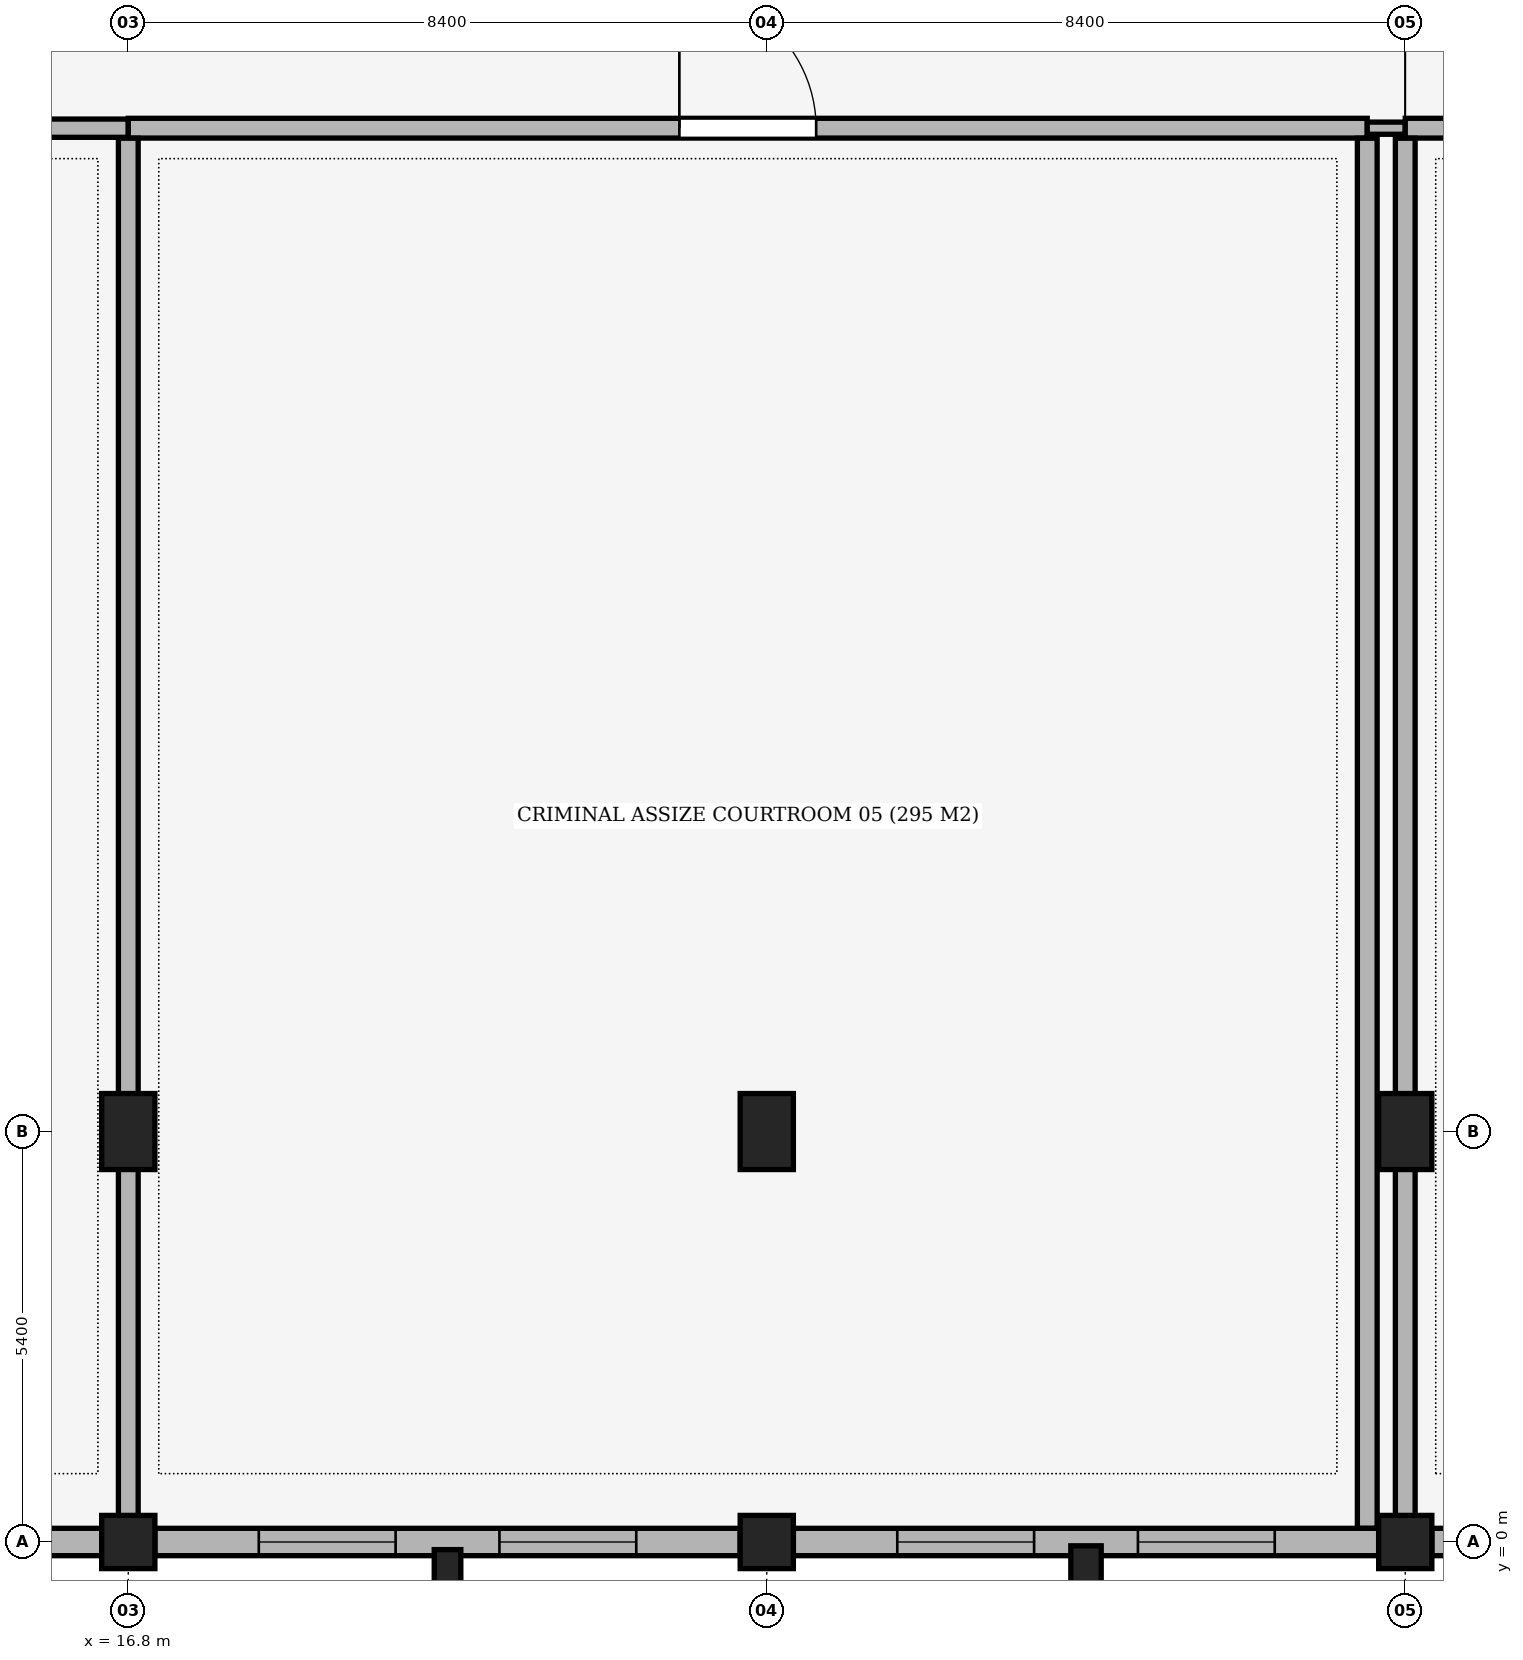
"""IFC4 building model, lengths in metres.
Left out: names, types, materials, properties, quantities, classifications, styles, units other than length and angle.
Written with IfcOpenShell. Run it as: python <this file> out.ifc"""

import sys

from ifc_helpers import new_model, si_unit, direction, frame, frame_2d, origin, origin_2d, place, context, subcontext, project, spatial, rectangle, extrude, element, fill, save


model = new_model("IFC4")
c1 = context("Model", 3, precision=1e-05, world=origin(), true_north=direction((0.0, 1.0)))
c2 = subcontext(c1, "Body", "Model", "MODEL_VIEW")
j1 = project(units=[si_unit("LENGTHUNIT", "METRE"), si_unit("PLANEANGLEUNIT", "RADIAN")], contexts=[c1])
p1 = place(None, origin())
s1 = spatial("IfcSite", under=j1, at=p1, CompositionType="ELEMENT")
p2 = place(p1, origin())
s2 = spatial("IfcBuilding", under=s1, at=p2, CompositionType="ELEMENT")
p3 = place(p2, frame((0.0, 0.0, 5.1)))
s3 = spatial("IfcBuildingStorey", under=s2, at=p3, CompositionType="ELEMENT", Elevation=5.1)
p4 = place(p3, frame((16.8, 0.0, 0.0), z_axis=(0.0, 0.0, 1.0), x_axis=(1.0, 0.0, 0.0)))
e1 = element("IfcColumn", 1, at=p4, inside=s3, PredefinedType="COLUMN", context=c2, shape_type="SweptSolid", body=[
    extrude(rectangle(XDim=0.7, YDim=0.7, at=origin_2d()), origin(), (0.0, 0.0, 1.0), 5.1),
])
p5 = place(p3, frame((16.8, 5.4, 0.0), z_axis=(0.0, 0.0, 1.0), x_axis=(1.0, 0.0, 0.0)))
e2 = element("IfcColumn", 2, at=p5, inside=s3, PredefinedType="COLUMN", context=c2, shape_type="SweptSolid", body=[
    extrude(rectangle(XDim=0.7, YDim=1.0, at=origin_2d()), origin(), (0.0, 0.0, 1.0), 5.1),
])
p6 = place(p3, frame((25.2, 0.0, 0.0), z_axis=(0.0, 0.0, 1.0), x_axis=(1.0, 0.0, 0.0)))
e3 = element("IfcColumn", 3, at=p6, inside=s3, PredefinedType="COLUMN", context=c2, shape_type="SweptSolid", body=[
    extrude(rectangle(XDim=0.7, YDim=0.7, at=origin_2d()), origin(), (0.0, 0.0, 1.0), 5.1),
])
p7 = place(p3, frame((25.2, 5.4, 0.0), z_axis=(0.0, 0.0, 1.0), x_axis=(1.0, 0.0, 0.0)))
e4 = element("IfcColumn", 4, at=p7, inside=s3, PredefinedType="COLUMN", context=c2, shape_type="SweptSolid", body=[
    extrude(rectangle(XDim=0.7, YDim=1.0, at=origin_2d()), origin(), (0.0, 0.0, 1.0), 5.1),
])
p8 = place(p3, frame((33.6, 0.0, 0.0), z_axis=(0.0, 0.0, 1.0), x_axis=(1.0, 0.0, 0.0)))
e5 = element("IfcColumn", 5, at=p8, inside=s3, PredefinedType="COLUMN", context=c2, shape_type="SweptSolid", body=[
    extrude(rectangle(XDim=0.7, YDim=0.7, at=origin_2d()), origin(), (0.0, 0.0, 1.0), 5.1),
])
p9 = place(p3, frame((33.6, 5.4, 0.0), z_axis=(0.0, 0.0, 1.0), x_axis=(1.0, 0.0, 0.0)))
e6 = element("IfcColumn", 6, at=p9, inside=s3, PredefinedType="COLUMN", context=c2, shape_type="SweptSolid", body=[
    extrude(rectangle(XDim=0.7, YDim=1.0, at=origin_2d()), origin(), (0.0, 0.0, 1.0), 5.1),
])
p10 = place(p3, frame((21.0, -0.35, 0.0), z_axis=(0.0, 0.0, 1.0), x_axis=(1.0, 0.0, 0.0)))
e7 = element("IfcColumn", 7, at=p10, inside=s3, PredefinedType="PILASTER", context=c2, shape_type="SweptSolid", body=[
    extrude(rectangle(XDim=0.35, YDim=0.5, at=origin_2d()), origin(), (0.0, 0.0, 1.0), 5.1),
])
p11 = place(p3, frame((29.4, -0.35, 0.0), z_axis=(0.0, 0.0, 1.0), x_axis=(1.0, 0.0, 0.0)))
e8 = element("IfcColumn", 8, at=p11, inside=s3, PredefinedType="PILASTER", context=c2, shape_type="SweptSolid", body=[
    extrude(rectangle(XDim=0.4, YDim=0.6, at=origin_2d()), origin(), (0.0, 0.0, 1.0), 5.1),
])
p12 = place(p3, frame((41.65, 0.0, 0.0), z_axis=(0.0, 0.0, 1.0), x_axis=(-1.0, 0.0, 0.0)))
e9 = element("IfcWall", 9, at=p12, inside=s3, PredefinedType="SOLIDWALL", context=c2, shape_type="SweptSolid", body=[
    extrude(rectangle(XDim=7.7, YDim=0.36, at=frame_2d((3.85, 0.0))), origin(), (0.0, 0.0, 1.0), 4.07),
])
p13 = place(p12, frame((2.25, 0.0, 0.75)))
e10 = element("IfcOpeningElement", 10, at=p13, cuts=e9, PredefinedType="OPENING", context=c2, shape_type="SweptSolid", body=[
    extrude(rectangle(XDim=3.2, YDim=2.6, at=frame_2d((1.6, 1.3))), frame((0.0, 0.195, 0.0), z_axis=(0.0, -1.0, 0.0), x_axis=(1.0, 0.0, 0.0)), (0.0, 0.0, 1.0), 0.39),
])
p14 = place(p3, frame((33.25, 0.0, 0.0), z_axis=(0.0, 0.0, 1.0), x_axis=(-1.0, 0.0, 0.0)))
e11 = element("IfcWall", 11, at=p14, inside=s3, PredefinedType="SOLIDWALL", context=c2, shape_type="SweptSolid", body=[
    extrude(rectangle(XDim=7.7, YDim=0.36, at=frame_2d((3.85, 0.0))), origin(), (0.0, 0.0, 1.0), 4.07),
])
p15 = place(p14, frame((1.367, 0.0, 0.85)))
e12 = element("IfcOpeningElement", 12, at=p15, cuts=e11, PredefinedType="OPENING", context=c2, shape_type="SweptSolid", body=[
    extrude(rectangle(XDim=1.8, YDim=2.4, at=frame_2d((0.9, 1.2))), frame((0.0, 0.195, 0.0), z_axis=(0.0, -1.0, 0.0), x_axis=(1.0, 0.0, 0.0)), (0.0, 0.0, 1.0), 0.39),
])
p16 = place(p14, frame((4.533, 0.0, 0.85)))
e13 = element("IfcOpeningElement", 13, at=p16, cuts=e11, PredefinedType="OPENING", context=c2, shape_type="SweptSolid", body=[
    extrude(rectangle(XDim=1.8, YDim=2.4, at=frame_2d((0.9, 1.2))), frame((0.0, 0.195, 0.0), z_axis=(0.0, -1.0, 0.0), x_axis=(1.0, 0.0, 0.0)), (0.0, 0.0, 1.0), 0.39),
])
p17 = place(p3, frame((24.85, 0.0, 0.0), z_axis=(0.0, 0.0, 1.0), x_axis=(-1.0, 0.0, 0.0)))
e14 = element("IfcWall", 14, at=p17, inside=s3, PredefinedType="SOLIDWALL", context=c2, shape_type="SweptSolid", body=[
    extrude(rectangle(XDim=7.7, YDim=0.36, at=frame_2d((3.85, 0.0))), origin(), (0.0, 0.0, 1.0), 4.07),
])
p18 = place(p17, frame((1.367, 0.0, 0.85)))
e15 = element("IfcOpeningElement", 15, at=p18, cuts=e14, PredefinedType="OPENING", context=c2, shape_type="SweptSolid", body=[
    extrude(rectangle(XDim=1.8, YDim=2.4, at=frame_2d((0.9, 1.2))), frame((0.0, 0.195, 0.0), z_axis=(0.0, -1.0, 0.0), x_axis=(1.0, 0.0, 0.0)), (0.0, 0.0, 1.0), 0.39),
])
p19 = place(p17, frame((4.533, 0.0, 0.85)))
e16 = element("IfcOpeningElement", 16, at=p19, cuts=e14, PredefinedType="OPENING", context=c2, shape_type="SweptSolid", body=[
    extrude(rectangle(XDim=1.8, YDim=2.4, at=frame_2d((0.9, 1.2))), frame((0.0, 0.195, 0.0), z_axis=(0.0, -1.0, 0.0), x_axis=(1.0, 0.0, 0.0)), (0.0, 0.0, 1.0), 0.39),
])
p20 = place(p3, frame((16.45, 0.0, 0.0), z_axis=(0.0, 0.0, 1.0), x_axis=(-1.0, 0.0, 0.0)))
e17 = element("IfcWall", 17, at=p20, inside=s3, PredefinedType="SOLIDWALL", context=c2, shape_type="SweptSolid", body=[
    extrude(rectangle(XDim=7.7, YDim=0.36, at=frame_2d((3.85, 0.0))), origin(), (0.0, 0.0, 1.0), 4.07),
])
p21 = place(p20, frame((1.367, 0.0, 0.85)))
e18 = element("IfcOpeningElement", 18, at=p21, cuts=e17, PredefinedType="OPENING", context=c2, shape_type="SweptSolid", body=[
    extrude(rectangle(XDim=1.8, YDim=2.4, at=frame_2d((0.9, 1.2))), frame((0.0, 0.195, 0.0), z_axis=(0.0, -1.0, 0.0), x_axis=(1.0, 0.0, 0.0)), (0.0, 0.0, 1.0), 0.39),
])
p22 = place(p20, frame((4.533, 0.0, 0.85)))
e19 = element("IfcOpeningElement", 19, at=p22, cuts=e17, PredefinedType="OPENING", context=c2, shape_type="SweptSolid", body=[
    extrude(rectangle(XDim=1.8, YDim=2.4, at=frame_2d((0.9, 1.2))), frame((0.0, 0.195, 0.0), z_axis=(0.0, -1.0, 0.0), x_axis=(1.0, 0.0, 0.0)), (0.0, 0.0, 1.0), 0.39),
])
p23 = place(p3, frame((0.182, 18.6, 0.0), z_axis=(0.0, 0.0, 1.0), x_axis=(1.0, 0.0, 0.0)))
e20 = element("IfcWall", 20, at=p23, inside=s3, PredefinedType="PARTITIONING", context=c2, shape_type="SweptSolid", body=[
    extrude(rectangle(XDim=16.618, YDim=0.24, at=frame_2d((8.309, 0.0))), origin(), (0.0, 0.0, 1.0), 3.67),
])
p24 = place(p23, frame((7.409, 0.0, 0.0)))
e21 = element("IfcOpeningElement", 21, at=p24, cuts=e20, PredefinedType="OPENING", context=c2, shape_type="SweptSolid", body=[
    extrude(rectangle(XDim=1.8, YDim=2.4, at=frame_2d((0.9, 1.2))), frame((0.0, 0.135, 0.0), z_axis=(0.0, -1.0, 0.0), x_axis=(1.0, 0.0, 0.0)), (0.0, 0.0, 1.0), 0.27),
])
p25 = place(p3, frame((16.8, 18.6, 0.0), z_axis=(0.0, 0.0, 1.0), x_axis=(1.0, 0.0, 0.0)))
e22 = element("IfcWall", 22, at=p25, inside=s3, PredefinedType="PARTITIONING", context=c2, shape_type="SweptSolid", body=[
    extrude(rectangle(XDim=16.3, YDim=0.26, at=frame_2d((8.15, 0.0))), origin(), (0.0, 0.0, 1.0), 3.67),
])
p26 = place(p25, frame((7.25, 0.0, 0.0)))
e23 = element("IfcOpeningElement", 23, at=p26, cuts=e22, PredefinedType="OPENING", context=c2, shape_type="SweptSolid", body=[
    extrude(rectangle(XDim=1.8, YDim=2.4, at=frame_2d((0.9, 1.2))), frame((0.0, 0.145, 0.0), z_axis=(0.0, -1.0, 0.0), x_axis=(1.0, 0.0, 0.0)), (0.0, 0.0, 1.0), 0.29),
])
p27 = place(p3, frame((33.1, 18.6, 0.0), z_axis=(0.0, 0.0, 1.0), x_axis=(1.0, 0.0, 0.0)))
e24 = element("IfcWall", 24, at=p27, inside=s3, PredefinedType="PARTITIONING", context=c2, shape_type="SweptSolid", body=[
    extrude(rectangle(XDim=0.5, YDim=0.16, at=frame_2d((0.25, 0.0))), origin(), (0.0, 0.0, 1.0), 3.67),
])
p28 = place(p3, frame((33.6, 18.6, 0.0), z_axis=(0.0, 0.0, 1.0), x_axis=(1.0, 0.0, 0.0)))
e25 = element("IfcWall", 25, at=p28, inside=s3, PredefinedType="PARTITIONING", context=c2, shape_type="SweptSolid", body=[
    extrude(rectangle(XDim=16.8, YDim=0.26, at=frame_2d((8.4, 0.0))), origin(), (0.0, 0.0, 1.0), 3.67),
])
p29 = place(p28, frame((7.5, 0.0, 0.0)))
e26 = element("IfcOpeningElement", 26, at=p29, cuts=e25, PredefinedType="OPENING", context=c2, shape_type="SweptSolid", body=[
    extrude(rectangle(XDim=1.8, YDim=2.4, at=frame_2d((0.9, 1.2))), frame((0.0, 0.145, 0.0), z_axis=(0.0, -1.0, 0.0), x_axis=(1.0, 0.0, 0.0)), (0.0, 0.0, 1.0), 0.29),
])
p30 = place(p3, frame((16.8, 0.065, 0.0), z_axis=(0.0, 0.0, 1.0), x_axis=(0.0, 1.0, 0.0)))
e27 = element("IfcWall", 27, at=p30, inside=s3, PredefinedType="PARTITIONING", context=c2, shape_type="SweptSolid", body=[
    extrude(rectangle(XDim=18.403, YDim=0.26, at=frame_2d((9.202, 0.0))), origin(), (0.0, 0.0, 1.0), 3.67),
])
p31 = place(p3, frame((33.1, 0.182, 0.0), z_axis=(0.0, 0.0, 1.0), x_axis=(0.0, 1.0, 0.0)))
e28 = element("IfcWall", 28, at=p31, inside=s3, PredefinedType="PARTITIONING", context=c2, shape_type="SweptSolid", body=[
    extrude(rectangle(XDim=18.286, YDim=0.26, at=frame_2d((9.143, 0.0))), origin(), (0.0, 0.0, 1.0), 4.07),
])
p32 = place(p3, frame((33.6, 0.065, 0.0), z_axis=(0.0, 0.0, 1.0), x_axis=(0.0, 1.0, 0.0)))
e29 = element("IfcWall", 29, at=p32, inside=s3, PredefinedType="PARTITIONING", context=c2, shape_type="SweptSolid", body=[
    extrude(rectangle(XDim=18.403, YDim=0.26, at=frame_2d((9.202, 0.0))), origin(), (0.0, 0.0, 1.0), 3.67),
])
p33 = place(p15, origin())
e30 = element("IfcWindow", 30, at=p33, inside=s3, PartitioningType="SINGLE_PANEL", PredefinedType="WINDOW", context=c2, shape_type="SweptSolid", body=[
    extrude(rectangle(XDim=1.8, YDim=2.4, at=frame_2d((0.9, 1.2))), frame((0.0, 0.03, 0.0), z_axis=(0.0, -1.0, 0.0), x_axis=(1.0, 0.0, 0.0)), (0.0, 0.0, 1.0), 0.06),
])
fill(e12, e30)
p34 = place(p16, origin())
e31 = element("IfcWindow", 31, at=p34, inside=s3, PartitioningType="SINGLE_PANEL", PredefinedType="WINDOW", context=c2, shape_type="SweptSolid", body=[
    extrude(rectangle(XDim=1.8, YDim=2.4, at=frame_2d((0.9, 1.2))), frame((0.0, 0.03, 0.0), z_axis=(0.0, -1.0, 0.0), x_axis=(1.0, 0.0, 0.0)), (0.0, 0.0, 1.0), 0.06),
])
fill(e13, e31)
p35 = place(p18, origin())
e32 = element("IfcWindow", 32, at=p35, inside=s3, PartitioningType="SINGLE_PANEL", PredefinedType="WINDOW", context=c2, shape_type="SweptSolid", body=[
    extrude(rectangle(XDim=1.8, YDim=2.4, at=frame_2d((0.9, 1.2))), frame((0.0, 0.03, 0.0), z_axis=(0.0, -1.0, 0.0), x_axis=(1.0, 0.0, 0.0)), (0.0, 0.0, 1.0), 0.06),
])
fill(e15, e32)
p36 = place(p19, origin())
e33 = element("IfcWindow", 33, at=p36, inside=s3, PartitioningType="SINGLE_PANEL", PredefinedType="WINDOW", context=c2, shape_type="SweptSolid", body=[
    extrude(rectangle(XDim=1.8, YDim=2.4, at=frame_2d((0.9, 1.2))), frame((0.0, 0.03, 0.0), z_axis=(0.0, -1.0, 0.0), x_axis=(1.0, 0.0, 0.0)), (0.0, 0.0, 1.0), 0.06),
])
fill(e16, e33)
p37 = place(p26, origin())
e34 = element("IfcDoor", 34, at=p37, inside=s3, OperationType="SINGLE_SWING_LEFT", PredefinedType="DOOR", context=c2, shape_type="SweptSolid", body=[
    extrude(rectangle(XDim=1.8, YDim=2.4, at=frame_2d((0.9, 1.2))), frame((0.0, 0.025, 0.0), z_axis=(0.0, -1.0, 0.0), x_axis=(1.0, 0.0, 0.0)), (0.0, 0.0, 1.0), 0.05),
])
fill(e23, e34)
save(model, sys.argv[1])
